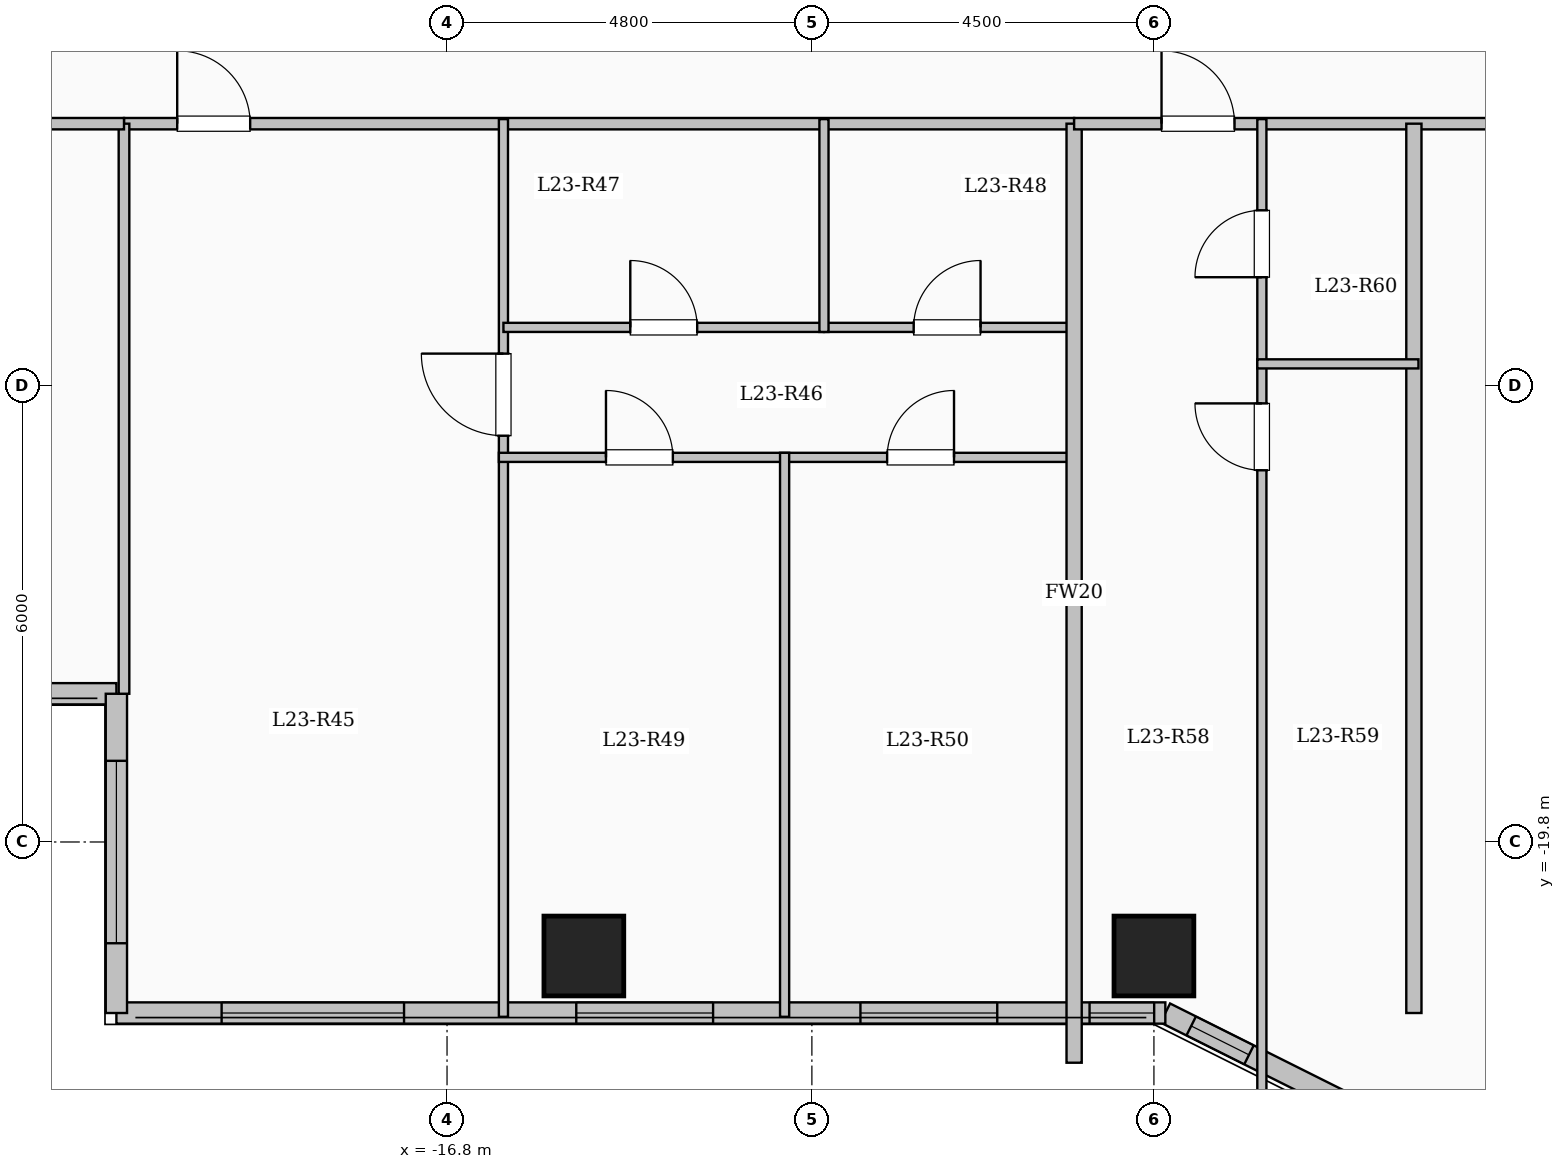
"""IFC4 building model, lengths in metres.
Left out: names, types, materials, properties, quantities, classifications, styles, units other than length and angle.
Written with IfcOpenShell. Run it as: python <this file> out.ifc"""

import sys

from ifc_helpers import new_model, si_unit, direction, frame, frame_2d, origin, origin_2d, place, context, subcontext, project, spatial, rectangle, extrude, element, fill, save


model = new_model("IFC4")
c1 = context("Model", 3, precision=1e-05, world=origin(), true_north=direction((0.0, 1.0)))
c2 = subcontext(c1, "Body", "Model", "MODEL_VIEW")
j1 = project(units=[si_unit("LENGTHUNIT", "METRE"), si_unit("PLANEANGLEUNIT", "RADIAN")], contexts=[c1])
p1 = place(None, origin())
s1 = spatial("IfcSite", under=j1, at=p1, CompositionType="ELEMENT")
p2 = place(p1, origin())
s2 = spatial("IfcBuilding", under=s1, at=p2, CompositionType="ELEMENT")
p3 = place(p2, frame((0.0, 0.0, 88.35)))
s3 = spatial("IfcBuildingStorey", under=s2, at=p3, CompositionType="ELEMENT", Elevation=88.35)
for number, where, z_axis, x_axis in (
    (1, (-15.0, -21.3, 0.0), (0.0, 0.0, 1.0), (1.0, 0.0, 0.0)),
    (2, (-7.5, -21.3, 0.0), (0.0, 0.0, 1.0), (1.0, 0.0, 0.0)),
):
    element("IfcColumn", number, at=place(p3, frame(where, z_axis=z_axis, x_axis=x_axis)), inside=s3, PredefinedType="COLUMN", context=c2, shape_type="SweptSolid", body=[
        extrude(rectangle(XDim=1.05, YDim=1.05, at=origin_2d()), origin(), (0.0, 0.0, 1.0), 3.35),
    ])
p4 = place(p3, frame((-21.15, -17.85, 0.0), z_axis=(0.0, 0.0, 1.0), x_axis=(-1.0, 0.0, 0.0)))
e3 = element("IfcWall", 3, at=p4, inside=s3, PredefinedType="SOLIDWALL", context=c2, shape_type="SweptSolid", body=[
    extrude(rectangle(XDim=5.7, YDim=0.28, at=frame_2d((2.85, 0.0))), origin(), (0.0, 0.0, 1.0), 3.1),
])
p5 = place(p4, frame((1.625, 0.0, 0.9)))
e4 = element("IfcOpeningElement", 4, at=p5, cuts=e3, PredefinedType="OPENING", context=c2, shape_type="SweptSolid", body=[
    extrude(rectangle(XDim=2.4, YDim=1.8, at=frame_2d((1.2, 0.9))), frame((0.0, 0.15, 0.0), z_axis=(0.0, -1.0, 0.0), x_axis=(1.0, 0.0, 0.0)), (0.0, 0.0, 1.0), 0.3),
])
p6 = place(p3, frame((-4.35, -23.55, 0.0), z_axis=(0.0, 0.0, 1.0), x_axis=(-0.894427191, 0.4472135955, 0.0)))
e5 = element("IfcWall", 5, at=p6, inside=s3, PredefinedType="SOLIDWALL", context=c2, shape_type="SweptSolid", body=[
    extrude(rectangle(XDim=3.354, YDim=0.28, at=frame_2d((1.677, 0.0))), origin(), (0.0, 0.0, 1.0), 3.1),
])
p7 = place(p6, frame((2.124, 0.0, 0.95)))
e6 = element("IfcOpeningElement", 6, at=p7, cuts=e5, PredefinedType="OPENING", context=c2, shape_type="SweptSolid", body=[
    extrude(rectangle(XDim=0.85, YDim=1.5, at=frame_2d((0.425, 0.75))), frame((0.0, 0.15, 0.0), z_axis=(0.0, -1.0, 0.0), x_axis=(1.0, 0.0, 0.0)), (0.0, 0.0, 1.0), 0.3),
])
p8 = place(p3, frame((-7.35, -22.05, 0.0), z_axis=(0.0, 0.0, 1.0), x_axis=(-1.0, 0.0, 0.0)))
e7 = element("IfcWall", 7, at=p8, inside=s3, PredefinedType="SOLIDWALL", context=c2, shape_type="SweptSolid", body=[
    extrude(rectangle(XDim=13.8, YDim=0.28, at=frame_2d((6.9, 0.0))), origin(), (0.0, 0.0, 1.0), 3.1),
])
p9 = place(p8, frame((0.147, 0.0, 0.95)))
e8 = element("IfcOpeningElement", 8, at=p9, cuts=e7, PredefinedType="OPENING", context=c2, shape_type="SweptSolid", body=[
    extrude(rectangle(XDim=0.85, YDim=1.5, at=frame_2d((0.425, 0.75))), frame((0.0, 0.15, 0.0), z_axis=(0.0, -1.0, 0.0), x_axis=(1.0, 0.0, 0.0)), (0.0, 0.0, 1.0), 0.3),
])
p10 = place(p8, frame((2.211, 0.0, 0.9)))
e9 = element("IfcOpeningElement", 9, at=p10, cuts=e7, PredefinedType="OPENING", context=c2, shape_type="SweptSolid", body=[
    extrude(rectangle(XDim=1.8, YDim=1.65, at=frame_2d((0.9, 0.825))), frame((0.0, 0.15, 0.0), z_axis=(0.0, -1.0, 0.0), x_axis=(1.0, 0.0, 0.0)), (0.0, 0.0, 1.0), 0.3),
])
p11 = place(p8, frame((5.95, 0.0, 0.9)))
e10 = element("IfcOpeningElement", 10, at=p11, cuts=e7, PredefinedType="OPENING", context=c2, shape_type="SweptSolid", body=[
    extrude(rectangle(XDim=1.8, YDim=1.65, at=frame_2d((0.9, 0.825))), frame((0.0, 0.15, 0.0), z_axis=(0.0, -1.0, 0.0), x_axis=(1.0, 0.0, 0.0)), (0.0, 0.0, 1.0), 0.3),
])
p12 = place(p8, frame((10.016, 0.0, 0.9)))
e11 = element("IfcOpeningElement", 11, at=p12, cuts=e7, PredefinedType="OPENING", context=c2, shape_type="SweptSolid", body=[
    extrude(rectangle(XDim=2.4, YDim=1.8, at=frame_2d((1.2, 0.9))), frame((0.0, 0.15, 0.0), z_axis=(0.0, -1.0, 0.0), x_axis=(1.0, 0.0, 0.0)), (0.0, 0.0, 1.0), 0.3),
])
p13 = place(p3, frame((-21.15, -22.05, 0.0), z_axis=(0.0, 0.0, 1.0), x_axis=(0.0, 1.0, 0.0)))
e12 = element("IfcWall", 12, at=p13, inside=s3, PredefinedType="SOLIDWALL", context=c2, shape_type="SweptSolid", body=[
    extrude(rectangle(XDim=4.2, YDim=0.28, at=frame_2d((2.1, 0.0))), origin(), (0.0, 0.0, 1.0), 3.1),
])
p14 = place(p13, frame((0.918, 0.0, 0.9)))
e13 = element("IfcOpeningElement", 13, at=p14, cuts=e12, PredefinedType="OPENING", context=c2, shape_type="SweptSolid", body=[
    extrude(rectangle(XDim=2.4, YDim=1.8, at=frame_2d((1.2, 0.9))), frame((0.0, 0.15, 0.0), z_axis=(0.0, -1.0, 0.0), x_axis=(1.0, 0.0, 0.0)), (0.0, 0.0, 1.0), 0.3),
])
p15 = place(p3, frame((-21.05, -10.35, 0.0), z_axis=(0.0, 0.0, 1.0), x_axis=(1.0, 0.0, 0.0)))
e14 = element("IfcWall", 14, at=p15, inside=s3, PredefinedType="PARTITIONING", context=c2, shape_type="SweptSolid", body=[
    extrude(rectangle(XDim=12.5, YDim=0.15, at=frame_2d((6.25, 0.0))), origin(), (0.0, 0.0, 1.0), 3.1),
])
p16 = place(p15, frame((0.7, 0.0, 0.0)))
e15 = element("IfcOpeningElement", 15, at=p16, cuts=e14, PredefinedType="OPENING", context=c2, shape_type="SweptSolid", body=[
    extrude(rectangle(XDim=0.96, YDim=2.15, at=frame_2d((0.48, 1.075))), frame((0.0, 0.085, 0.0), z_axis=(0.0, -1.0, 0.0), x_axis=(1.0, 0.0, 0.0)), (0.0, 0.0, 1.0), 0.17),
])
p17 = place(p3, frame((-16.058, -22.1, 0.0), z_axis=(0.0, 0.0, 1.0), x_axis=(0.0, 1.0, 0.0)))
e16 = element("IfcWall", 16, at=p17, inside=s3, PredefinedType="PARTITIONING", context=c2, shape_type="SweptSolid", body=[
    extrude(rectangle(XDim=11.81, YDim=0.12, at=frame_2d((5.905, 0.0))), origin(), (0.0, 0.0, 1.0), 3.1),
])
p18 = place(p17, frame((7.645, 0.0, 0.0)))
e17 = element("IfcOpeningElement", 17, at=p18, cuts=e16, PredefinedType="OPENING", context=c2, shape_type="SweptSolid", body=[
    extrude(rectangle(XDim=1.08, YDim=2.15, at=frame_2d((0.54, 1.075))), frame((0.0, 0.07, 0.0), z_axis=(0.0, -1.0, 0.0), x_axis=(1.0, 0.0, 0.0)), (0.0, 0.0, 1.0), 0.14),
])
p19 = place(p3, frame((-16.058, -13.03, 0.0), z_axis=(0.0, 0.0, 1.0), x_axis=(1.0, 0.0, 0.0)))
e18 = element("IfcWall", 18, at=p19, inside=s3, PredefinedType="PARTITIONING", context=c2, shape_type="SweptSolid", body=[
    extrude(rectangle(XDim=4.217, YDim=0.12, at=frame_2d((2.108, 0.0))), origin(), (0.0, 0.0, 1.0), 3.1),
])
p20 = place(p19, frame((1.669, 0.0, 0.0)))
e19 = element("IfcOpeningElement", 19, at=p20, cuts=e18, PredefinedType="OPENING", context=c2, shape_type="SweptSolid", body=[
    extrude(rectangle(XDim=0.88, YDim=2.1, at=frame_2d((0.44, 1.05))), frame((0.0, 0.07, 0.0), z_axis=(0.0, -1.0, 0.0), x_axis=(1.0, 0.0, 0.0)), (0.0, 0.0, 1.0), 0.14),
])
p21 = place(p3, frame((-11.841, -13.03, 0.0), z_axis=(0.0, 0.0, 1.0), x_axis=(1.0, 0.0, 0.0)))
e20 = element("IfcWall", 20, at=p21, inside=s3, PredefinedType="PARTITIONING", context=c2, shape_type="SweptSolid", body=[
    extrude(rectangle(XDim=3.241, YDim=0.12, at=frame_2d((1.621, 0.0))), origin(), (0.0, 0.0, 1.0), 3.1),
])
p22 = place(p21, frame((1.18, 0.0, 0.0)))
e21 = element("IfcOpeningElement", 21, at=p22, cuts=e20, PredefinedType="OPENING", context=c2, shape_type="SweptSolid", body=[
    extrude(rectangle(XDim=0.88, YDim=2.1, at=frame_2d((0.44, 1.05))), frame((0.0, 0.07, 0.0), z_axis=(0.0, -1.0, 0.0), x_axis=(1.0, 0.0, 0.0)), (0.0, 0.0, 1.0), 0.14),
])
p23 = place(p3, frame((-16.118, -14.74, 0.0), z_axis=(0.0, 0.0, 1.0), x_axis=(1.0, 0.0, 0.0)))
e22 = element("IfcWall", 22, at=p23, inside=s3, PredefinedType="PARTITIONING", context=c2, shape_type="SweptSolid", body=[
    extrude(rectangle(XDim=7.578, YDim=0.12, at=frame_2d((3.789, 0.0))), origin(), (0.0, 0.0, 1.0), 3.1),
])
p24 = place(p23, frame((1.409, 0.0, 0.0)))
e23 = element("IfcOpeningElement", 23, at=p24, cuts=e22, PredefinedType="OPENING", context=c2, shape_type="SweptSolid", body=[
    extrude(rectangle(XDim=0.88, YDim=2.1, at=frame_2d((0.44, 1.05))), frame((0.0, 0.07, 0.0), z_axis=(0.0, -1.0, 0.0), x_axis=(1.0, 0.0, 0.0)), (0.0, 0.0, 1.0), 0.14),
])
p25 = place(p23, frame((5.108, 0.0, 0.0)))
e24 = element("IfcOpeningElement", 24, at=p25, cuts=e22, PredefinedType="OPENING", context=c2, shape_type="SweptSolid", body=[
    extrude(rectangle(XDim=0.88, YDim=2.1, at=frame_2d((0.44, 1.05))), frame((0.0, 0.07, 0.0), z_axis=(0.0, -1.0, 0.0), x_axis=(1.0, 0.0, 0.0)), (0.0, 0.0, 1.0), 0.14),
])
p26 = place(p3, frame((-11.841, -13.09, 0.0), z_axis=(0.0, 0.0, 1.0), x_axis=(0.0, 1.0, 0.0)))
e25 = element("IfcWall", 25, at=p26, inside=s3, PredefinedType="PARTITIONING", context=c2, shape_type="SweptSolid", body=[
    extrude(rectangle(XDim=2.8, YDim=0.12, at=frame_2d((1.4, 0.0))), origin(), (0.0, 0.0, 1.0), 3.1),
])
p27 = place(p3, frame((-12.359, -22.1, 0.0), z_axis=(0.0, 0.0, 1.0), x_axis=(0.0, 1.0, 0.0)))
e26 = element("IfcWall", 26, at=p27, inside=s3, PredefinedType="PARTITIONING", context=c2, shape_type="SweptSolid", body=[
    extrude(rectangle(XDim=7.42, YDim=0.12, at=frame_2d((3.71, 0.0))), origin(), (0.0, 0.0, 1.0), 3.1),
])
p28 = place(p3, frame((-8.55, -22.704, 0.0), z_axis=(0.0, 0.0, 1.0), x_axis=(0.0, 1.0, 0.0)))
e27 = element("IfcWall", 27, at=p28, inside=s3, PredefinedType="SOLIDWALL", context=c2, shape_type="SweptSolid", body=[
    extrude(rectangle(XDim=12.354, YDim=0.2, at=frame_2d((6.177, 0.0))), origin(), (0.0, 0.0, 1.0), 3.1),
])
p29 = place(p3, frame((-8.55, -10.35, 0.0), z_axis=(0.0, 0.0, 1.0), x_axis=(1.0, 0.0, 0.0)))
e28 = element("IfcWall", 28, at=p29, inside=s3, PredefinedType="PARTITIONING", context=c2, shape_type="SweptSolid", body=[
    extrude(rectangle(XDim=17.1, YDim=0.15, at=frame_2d((8.55, 0.0))), origin(), (0.0, 0.0, 1.0), 3.1),
])
p30 = place(p29, frame((1.15, 0.0, 0.0)))
e29 = element("IfcOpeningElement", 29, at=p30, cuts=e28, PredefinedType="OPENING", context=c2, shape_type="SweptSolid", body=[
    extrude(rectangle(XDim=0.96, YDim=2.15, at=frame_2d((0.48, 1.075))), frame((0.0, 0.085, 0.0), z_axis=(0.0, -1.0, 0.0), x_axis=(1.0, 0.0, 0.0)), (0.0, 0.0, 1.0), 0.17),
])
p31 = place(p29, frame((10.5, 0.0, 0.0)))
e30 = element("IfcOpeningElement", 30, at=p31, cuts=e28, PredefinedType="OPENING", context=c2, shape_type="SweptSolid", body=[
    extrude(rectangle(XDim=0.96, YDim=2.15, at=frame_2d((0.48, 1.075))), frame((0.0, 0.085, 0.0), z_axis=(0.0, -1.0, 0.0), x_axis=(1.0, 0.0, 0.0)), (0.0, 0.0, 1.0), 0.17),
])
p32 = place(p3, frame((-4.08, -22.05, 0.0), z_axis=(0.0, 0.0, 1.0), x_axis=(0.0, 1.0, 0.0)))
e31 = element("IfcWall", 31, at=p32, inside=s3, PredefinedType="SOLIDWALL", context=c2, shape_type="SweptSolid", body=[
    extrude(rectangle(XDim=11.7, YDim=0.2, at=frame_2d((5.85, 0.0))), origin(), (0.0, 0.0, 1.0), 3.1),
])
p33 = place(p3, frame((-6.08, -23.314, 0.0), z_axis=(0.0, 0.0, 1.0), x_axis=(0.0, 1.0, 0.0)))
e32 = element("IfcWall", 32, at=p33, inside=s3, PredefinedType="PARTITIONING", context=c2, shape_type="SweptSolid", body=[
    extrude(rectangle(XDim=9.804, YDim=0.12, at=frame_2d((4.902, 0.0))), origin(), (0.0, 0.0, 1.0), 3.1),
])
p34 = place(p33, frame((8.404, 0.0, 0.0)))
e33 = element("IfcOpeningElement", 33, at=p34, cuts=e32, PredefinedType="OPENING", context=c2, shape_type="SweptSolid", body=[
    extrude(rectangle(XDim=0.88, YDim=2.1, at=frame_2d((0.44, 1.05))), frame((0.0, 0.07, 0.0), z_axis=(0.0, -1.0, 0.0), x_axis=(1.0, 0.0, 0.0)), (0.0, 0.0, 1.0), 0.14),
])
p35 = place(p3, frame((-6.08, -13.51, 0.0), z_axis=(0.0, 0.0, 1.0), x_axis=(0.0, 1.0, 0.0)))
e34 = element("IfcWall", 34, at=p35, inside=s3, PredefinedType="PARTITIONING", context=c2, shape_type="SweptSolid", body=[
    extrude(rectangle(XDim=3.22, YDim=0.12, at=frame_2d((1.61, 0.0))), origin(), (0.0, 0.0, 1.0), 3.1),
])
p36 = place(p35, frame((1.14, 0.0, 0.0)))
e35 = element("IfcOpeningElement", 35, at=p36, cuts=e34, PredefinedType="OPENING", context=c2, shape_type="SweptSolid", body=[
    extrude(rectangle(XDim=0.88, YDim=2.1, at=frame_2d((0.44, 1.05))), frame((0.0, 0.07, 0.0), z_axis=(0.0, -1.0, 0.0), x_axis=(1.0, 0.0, 0.0)), (0.0, 0.0, 1.0), 0.14),
])
p37 = place(p3, frame((-6.14, -13.51, 0.0), z_axis=(0.0, 0.0, 1.0), x_axis=(1.0, 0.0, 0.0)))
e36 = element("IfcWall", 36, at=p37, inside=s3, PredefinedType="PARTITIONING", context=c2, shape_type="SweptSolid", body=[
    extrude(rectangle(XDim=2.12, YDim=0.12, at=frame_2d((1.06, 0.0))), origin(), (0.0, 0.0, 1.0), 3.1),
])
p38 = place(p3, frame((-21.05, -17.85, 0.0), z_axis=(0.0, 0.0, 1.0), x_axis=(0.0, 1.0, 0.0)))
e37 = element("IfcWall", 37, at=p38, inside=s3, PredefinedType="PARTITIONING", context=c2, shape_type="SweptSolid", body=[
    extrude(rectangle(XDim=7.5, YDim=0.14, at=frame_2d((3.75, 0.0))), origin(), (0.0, 0.0, 1.0), 3.1),
])
p39 = place(p3, frame((-26.88, -10.35, 0.0), z_axis=(0.0, 0.0, 1.0), x_axis=(1.0, 0.0, 0.0)))
e38 = element("IfcWall", 38, at=p39, inside=s3, PredefinedType="PARTITIONING", context=c2, shape_type="SweptSolid", body=[
    extrude(rectangle(XDim=5.83, YDim=0.15, at=frame_2d((2.915, 0.0))), origin(), (0.0, 0.0, 1.0), 3.1),
])
p40 = place(p39, frame((2.44, 0.0, 0.0)))
e39 = element("IfcOpeningElement", 39, at=p40, cuts=e38, PredefinedType="OPENING", context=c2, shape_type="SweptSolid", body=[
    extrude(rectangle(XDim=0.95, YDim=2.15, at=frame_2d((0.475, 1.075))), frame((0.0, 0.085, 0.0), z_axis=(0.0, -1.0, 0.0), x_axis=(1.0, 0.0, 0.0)), (0.0, 0.0, 1.0), 0.17),
])
p41 = place(p7, origin())
e40 = element("IfcWindow", 40, at=p41, inside=s3, PartitioningType="SINGLE_PANEL", PredefinedType="WINDOW", context=c2, shape_type="SweptSolid", body=[
    extrude(rectangle(XDim=0.85, YDim=1.5, at=frame_2d((0.425, 0.75))), frame((0.0, 0.03, 0.0), z_axis=(0.0, -1.0, 0.0), x_axis=(1.0, 0.0, 0.0)), (0.0, 0.0, 1.0), 0.06),
])
fill(e6, e40)
p42 = place(p9, origin())
e41 = element("IfcWindow", 41, at=p42, inside=s3, PartitioningType="SINGLE_PANEL", PredefinedType="WINDOW", context=c2, shape_type="SweptSolid", body=[
    extrude(rectangle(XDim=0.85, YDim=1.5, at=frame_2d((0.425, 0.75))), frame((0.0, 0.03, 0.0), z_axis=(0.0, -1.0, 0.0), x_axis=(1.0, 0.0, 0.0)), (0.0, 0.0, 1.0), 0.06),
])
fill(e8, e41)
p43 = place(p10, origin())
e42 = element("IfcWindow", 42, at=p43, inside=s3, PartitioningType="SINGLE_PANEL", PredefinedType="WINDOW", context=c2, shape_type="SweptSolid", body=[
    extrude(rectangle(XDim=1.8, YDim=1.65, at=frame_2d((0.9, 0.825))), frame((0.0, 0.03, 0.0), z_axis=(0.0, -1.0, 0.0), x_axis=(1.0, 0.0, 0.0)), (0.0, 0.0, 1.0), 0.06),
])
fill(e9, e42)
p44 = place(p11, origin())
e43 = element("IfcWindow", 43, at=p44, inside=s3, PartitioningType="SINGLE_PANEL", PredefinedType="WINDOW", context=c2, shape_type="SweptSolid", body=[
    extrude(rectangle(XDim=1.8, YDim=1.65, at=frame_2d((0.9, 0.825))), frame((0.0, 0.03, 0.0), z_axis=(0.0, -1.0, 0.0), x_axis=(1.0, 0.0, 0.0)), (0.0, 0.0, 1.0), 0.06),
])
fill(e10, e43)
p45 = place(p12, origin())
e44 = element("IfcWindow", 44, at=p45, inside=s3, PartitioningType="SINGLE_PANEL", PredefinedType="WINDOW", context=c2, shape_type="SweptSolid", body=[
    extrude(rectangle(XDim=2.4, YDim=1.8, at=frame_2d((1.2, 0.9))), frame((0.0, 0.03, 0.0), z_axis=(0.0, -1.0, 0.0), x_axis=(1.0, 0.0, 0.0)), (0.0, 0.0, 1.0), 0.06),
])
fill(e11, e44)
p46 = place(p14, origin())
e45 = element("IfcWindow", 45, at=p46, inside=s3, PartitioningType="SINGLE_PANEL", PredefinedType="WINDOW", context=c2, shape_type="SweptSolid", body=[
    extrude(rectangle(XDim=2.4, YDim=1.8, at=frame_2d((1.2, 0.9))), frame((0.0, 0.03, 0.0), z_axis=(0.0, -1.0, 0.0), x_axis=(1.0, 0.0, 0.0)), (0.0, 0.0, 1.0), 0.06),
])
fill(e13, e45)
p47 = place(p16, origin())
e46 = element("IfcDoor", 46, at=p47, inside=s3, OperationType="SINGLE_SWING_LEFT", PredefinedType="DOOR", context=c2, shape_type="SweptSolid", body=[
    extrude(rectangle(XDim=0.96, YDim=2.15, at=frame_2d((0.48, 1.075))), frame((0.0, 0.025, 0.0), z_axis=(0.0, -1.0, 0.0), x_axis=(1.0, 0.0, 0.0)), (0.0, 0.0, 1.0), 0.05),
])
fill(e15, e46)
p48 = place(p18, origin())
e47 = element("IfcDoor", 47, at=p48, inside=s3, OperationType="SINGLE_SWING_RIGHT", PredefinedType="DOOR", context=c2, shape_type="SweptSolid", body=[
    extrude(rectangle(XDim=1.08, YDim=2.15, at=frame_2d((0.54, 1.075))), frame((0.0, 0.025, 0.0), z_axis=(0.0, -1.0, 0.0), x_axis=(1.0, 0.0, 0.0)), (0.0, 0.0, 1.0), 0.05),
])
fill(e17, e47)
p49 = place(p20, origin())
e48 = element("IfcDoor", 48, at=p49, inside=s3, OperationType="SINGLE_SWING_LEFT", PredefinedType="DOOR", context=c2, shape_type="SweptSolid", body=[
    extrude(rectangle(XDim=0.88, YDim=2.1, at=frame_2d((0.44, 1.05))), frame((0.0, 0.025, 0.0), z_axis=(0.0, -1.0, 0.0), x_axis=(1.0, 0.0, 0.0)), (0.0, 0.0, 1.0), 0.05),
])
fill(e19, e48)
p50 = place(p22, origin())
e49 = element("IfcDoor", 49, at=p50, inside=s3, OperationType="SINGLE_SWING_RIGHT", PredefinedType="DOOR", context=c2, shape_type="SweptSolid", body=[
    extrude(rectangle(XDim=0.88, YDim=2.1, at=frame_2d((0.44, 1.05))), frame((0.0, 0.025, 0.0), z_axis=(0.0, -1.0, 0.0), x_axis=(1.0, 0.0, 0.0)), (0.0, 0.0, 1.0), 0.05),
])
fill(e21, e49)
p51 = place(p24, origin())
e50 = element("IfcDoor", 50, at=p51, inside=s3, OperationType="SINGLE_SWING_LEFT", PredefinedType="DOOR", context=c2, shape_type="SweptSolid", body=[
    extrude(rectangle(XDim=0.88, YDim=2.1, at=frame_2d((0.44, 1.05))), frame((0.0, 0.025, 0.0), z_axis=(0.0, -1.0, 0.0), x_axis=(1.0, 0.0, 0.0)), (0.0, 0.0, 1.0), 0.05),
])
fill(e23, e50)
p52 = place(p25, origin())
e51 = element("IfcDoor", 51, at=p52, inside=s3, OperationType="SINGLE_SWING_RIGHT", PredefinedType="DOOR", context=c2, shape_type="SweptSolid", body=[
    extrude(rectangle(XDim=0.88, YDim=2.1, at=frame_2d((0.44, 1.05))), frame((0.0, 0.025, 0.0), z_axis=(0.0, -1.0, 0.0), x_axis=(1.0, 0.0, 0.0)), (0.0, 0.0, 1.0), 0.05),
])
fill(e24, e51)
p53 = place(p30, origin())
e52 = element("IfcDoor", 52, at=p53, inside=s3, OperationType="SINGLE_SWING_LEFT", PredefinedType="DOOR", context=c2, shape_type="SweptSolid", body=[
    extrude(rectangle(XDim=0.96, YDim=2.15, at=frame_2d((0.48, 1.075))), frame((0.0, 0.025, 0.0), z_axis=(0.0, -1.0, 0.0), x_axis=(1.0, 0.0, 0.0)), (0.0, 0.0, 1.0), 0.05),
])
fill(e29, e52)
p54 = place(p34, origin())
e53 = element("IfcDoor", 53, at=p54, inside=s3, OperationType="SINGLE_SWING_RIGHT", PredefinedType="DOOR", context=c2, shape_type="SweptSolid", body=[
    extrude(rectangle(XDim=0.88, YDim=2.1, at=frame_2d((0.44, 1.05))), frame((0.0, 0.025, 0.0), z_axis=(0.0, -1.0, 0.0), x_axis=(1.0, 0.0, 0.0)), (0.0, 0.0, 1.0), 0.05),
])
fill(e33, e53)
p55 = place(p36, origin())
e54 = element("IfcDoor", 54, at=p55, inside=s3, OperationType="SINGLE_SWING_LEFT", PredefinedType="DOOR", context=c2, shape_type="SweptSolid", body=[
    extrude(rectangle(XDim=0.88, YDim=2.1, at=frame_2d((0.44, 1.05))), frame((0.0, 0.025, 0.0), z_axis=(0.0, -1.0, 0.0), x_axis=(1.0, 0.0, 0.0)), (0.0, 0.0, 1.0), 0.05),
])
fill(e35, e54)
save(model, sys.argv[1])
